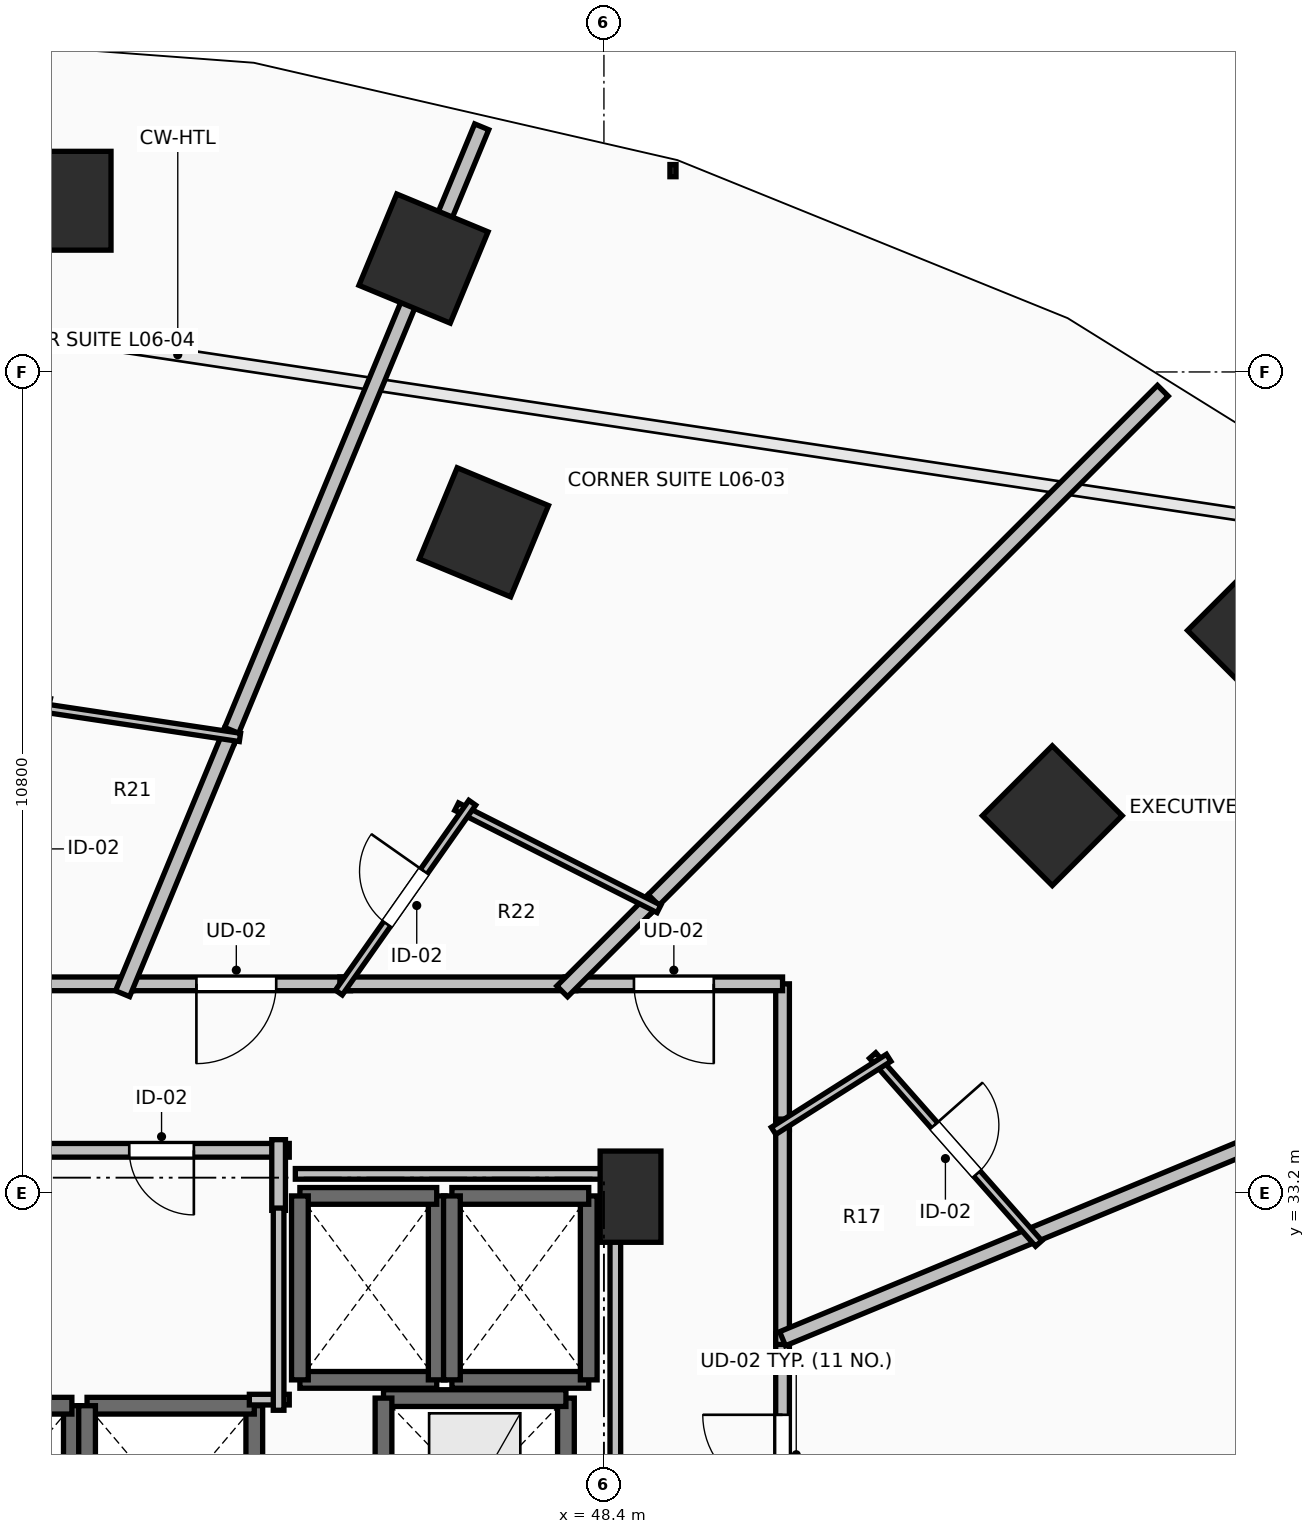
"""IFC4 building model, lengths in metres.
Left out: names, types, materials, properties, quantities, classifications, styles, units other than length and angle.
Written with IfcOpenShell. Run it as: python <this file> out.ifc"""

import sys

from ifc_helpers import new_model, si_unit, direction, frame, frame_2d, origin, origin_2d, place, context, subcontext, project, spatial, rectangle, extrude, element, fill, save


model = new_model("IFC4")
c1 = context("Model", 3, precision=1e-05, world=origin(), true_north=direction((0.0, 1.0)))
c2 = subcontext(c1, "Body", "Model", "MODEL_VIEW")
j1 = project(units=[si_unit("LENGTHUNIT", "METRE"), si_unit("PLANEANGLEUNIT", "RADIAN")], contexts=[c1])
p1 = place(None, origin())
s1 = spatial("IfcSite", under=j1, at=p1, CompositionType="ELEMENT")
p2 = place(p1, origin())
s2 = spatial("IfcBuilding", under=s1, at=p2, CompositionType="ELEMENT")
p3 = place(p2, frame((0.0, 0.0, 27.5)))
s3 = spatial("IfcBuildingStorey", under=s2, at=p3, CompositionType="ELEMENT", Elevation=27.5)
for number, where, z_axis, x_axis in (
    (1, (54.299, 38.162, 0.0), (0.0, 0.0, 1.0), (0.707, 0.707, 0.0)),
    (2, (46.821, 41.891, 0.0), (0.0, 0.0, 1.0), (0.383, 0.924, 0.0)),
    (3, (56.997, 40.6, 0.0), (0.0, 0.0, 1.0), (0.707, 0.707, 0.0)),
    (4, (46.026, 45.492, 0.0), (0.0, 0.0, 1.0), (0.383, 0.924, 0.0)),
    (5, (41.265, 46.252, 0.0), (0.0, 0.0, 1.0), (0.0, 1.0, 0.0)),
):
    element("IfcColumn", number, at=place(p3, frame(where, z_axis=z_axis, x_axis=x_axis)), inside=s3, PredefinedType="COLUMN", context=c2, shape_type="SweptSolid", body=[
        extrude(rectangle(XDim=1.3, YDim=1.3, at=origin_2d()), origin(), (0.0, 0.0, 1.0), 3.5),
    ])
p4 = place(p3, frame((48.75, 33.15, 0.0), z_axis=(0.0, 0.0, 1.0), x_axis=(1.0, 0.0, 0.0)))
e6 = element("IfcColumn", 6, at=p4, inside=s3, PredefinedType="PILASTER", context=c2, shape_type="SweptSolid", body=[
    extrude(rectangle(XDim=0.8, YDim=1.2, at=origin_2d()), origin(), (0.0, 0.0, 1.0), 3.5),
])
p5 = place(p3, frame((41.4, 27.8, 0.0), z_axis=(0.0, 0.0, 1.0), x_axis=(0.0, 1.0, 0.0)))
e7 = element("IfcWall", 7, at=p5, inside=s3, PredefinedType="SOLIDWALL", context=c2, shape_type="SweptSolid", body=[
    extrude(rectangle(XDim=2.6, YDim=0.22, at=frame_2d((1.3, 0.0))), origin(), (0.0, 0.0, 1.0), 3.24),
])
p6 = place(p3, frame((41.4, 30.4, 0.0), z_axis=(0.0, 0.0, 1.0), x_axis=(-1.0, 0.0, 0.0)))
e8 = element("IfcWall", 8, at=p6, inside=s3, PredefinedType="SOLIDWALL", context=c2, shape_type="SweptSolid", body=[
    extrude(rectangle(XDim=2.2, YDim=0.22, at=frame_2d((1.1, 0.0))), origin(), (0.0, 0.0, 1.0), 3.24),
])
p7 = place(p3, frame((43.8, 27.8, 0.0), z_axis=(0.0, 0.0, 1.0), x_axis=(0.0, 1.0, 0.0)))
e9 = element("IfcWall", 9, at=p7, inside=s3, PredefinedType="SOLIDWALL", context=c2, shape_type="SweptSolid", body=[
    extrude(rectangle(XDim=2.6, YDim=0.22, at=frame_2d((1.3, 0.0))), origin(), (0.0, 0.0, 1.0), 3.24),
])
p8 = place(p3, frame((43.8, 30.4, 0.0), z_axis=(0.0, 0.0, 1.0), x_axis=(-1.0, 0.0, 0.0)))
e10 = element("IfcWall", 10, at=p8, inside=s3, PredefinedType="SOLIDWALL", context=c2, shape_type="SweptSolid", body=[
    extrude(rectangle(XDim=2.2, YDim=0.22, at=frame_2d((1.1, 0.0))), origin(), (0.0, 0.0, 1.0), 3.24),
])
p9 = place(p3, frame((41.6, 30.4, 0.0), z_axis=(0.0, 0.0, 1.0), x_axis=(0.0, -1.0, 0.0)))
e11 = element("IfcWall", 11, at=p9, inside=s3, PredefinedType="SOLIDWALL", context=c2, shape_type="SweptSolid", body=[
    extrude(rectangle(XDim=2.6, YDim=0.22, at=frame_2d((1.3, 0.0))), origin(), (0.0, 0.0, 1.0), 3.24),
])
p10 = place(p3, frame((44.4, 30.74, 0.0), z_axis=(0.0, 0.0, 1.0), x_axis=(1.0, 0.0, 0.0)))
e12 = element("IfcWall", 12, at=p10, inside=s3, PredefinedType="SOLIDWALL", context=c2, shape_type="SweptSolid", body=[
    extrude(rectangle(XDim=1.8, YDim=0.22, at=frame_2d((0.9, 0.0))), origin(), (0.0, 0.0, 1.0), 3.24),
])
p11 = place(p3, frame((46.2, 30.74, 0.0), z_axis=(0.0, 0.0, 1.0), x_axis=(0.0, 1.0, 0.0)))
e13 = element("IfcWall", 13, at=p11, inside=s3, PredefinedType="SOLIDWALL", context=c2, shape_type="SweptSolid", body=[
    extrude(rectangle(XDim=2.42, YDim=0.22, at=frame_2d((1.21, 0.0))), origin(), (0.0, 0.0, 1.0), 3.24),
])
p12 = place(p3, frame((46.2, 33.16, 0.0), z_axis=(0.0, 0.0, 1.0), x_axis=(-1.0, 0.0, 0.0)))
e14 = element("IfcWall", 14, at=p12, inside=s3, PredefinedType="SOLIDWALL", context=c2, shape_type="SweptSolid", body=[
    extrude(rectangle(XDim=1.8, YDim=0.22, at=frame_2d((0.9, 0.0))), origin(), (0.0, 0.0, 1.0), 3.24),
])
p13 = place(p3, frame((44.4, 33.16, 0.0), z_axis=(0.0, 0.0, 1.0), x_axis=(0.0, -1.0, 0.0)))
e15 = element("IfcWall", 15, at=p13, inside=s3, PredefinedType="SOLIDWALL", context=c2, shape_type="SweptSolid", body=[
    extrude(rectangle(XDim=2.42, YDim=0.22, at=frame_2d((1.21, 0.0))), origin(), (0.0, 0.0, 1.0), 3.24),
])
p14 = place(p3, frame((46.4, 30.74, 0.0), z_axis=(0.0, 0.0, 1.0), x_axis=(1.0, 0.0, 0.0)))
e16 = element("IfcWall", 16, at=p14, inside=s3, PredefinedType="SOLIDWALL", context=c2, shape_type="SweptSolid", body=[
    extrude(rectangle(XDim=1.8, YDim=0.22, at=frame_2d((0.9, 0.0))), origin(), (0.0, 0.0, 1.0), 3.24),
])
p15 = place(p3, frame((48.2, 30.74, 0.0), z_axis=(0.0, 0.0, 1.0), x_axis=(0.0, 1.0, 0.0)))
e17 = element("IfcWall", 17, at=p15, inside=s3, PredefinedType="SOLIDWALL", context=c2, shape_type="SweptSolid", body=[
    extrude(rectangle(XDim=2.42, YDim=0.22, at=frame_2d((1.21, 0.0))), origin(), (0.0, 0.0, 1.0), 3.24),
])
p16 = place(p3, frame((48.2, 33.16, 0.0), z_axis=(0.0, 0.0, 1.0), x_axis=(-1.0, 0.0, 0.0)))
e18 = element("IfcWall", 18, at=p16, inside=s3, PredefinedType="SOLIDWALL", context=c2, shape_type="SweptSolid", body=[
    extrude(rectangle(XDim=1.8, YDim=0.22, at=frame_2d((0.9, 0.0))), origin(), (0.0, 0.0, 1.0), 3.24),
])
p17 = place(p3, frame((46.4, 33.16, 0.0), z_axis=(0.0, 0.0, 1.0), x_axis=(0.0, -1.0, 0.0)))
e19 = element("IfcWall", 19, at=p17, inside=s3, PredefinedType="SOLIDWALL", context=c2, shape_type="SweptSolid", body=[
    extrude(rectangle(XDim=2.42, YDim=0.22, at=frame_2d((1.21, 0.0))), origin(), (0.0, 0.0, 1.0), 3.24),
])
p18 = place(p3, frame((47.9, 28.0, 0.0), z_axis=(0.0, 0.0, 1.0), x_axis=(0.0, 1.0, 0.0)))
e20 = element("IfcWall", 20, at=p18, inside=s3, PredefinedType="SHEAR", context=c2, shape_type="SweptSolid", body=[
    extrude(rectangle(XDim=2.5, YDim=0.22, at=frame_2d((1.25, 0.0))), origin(), (0.0, 0.0, 1.0), 3.24),
])
p19 = place(p3, frame((47.9, 30.5, 0.0), z_axis=(0.0, 0.0, 1.0), x_axis=(-1.0, 0.0, 0.0)))
e21 = element("IfcWall", 21, at=p19, inside=s3, PredefinedType="SHEAR", context=c2, shape_type="SweptSolid", body=[
    extrude(rectangle(XDim=2.4, YDim=0.22, at=frame_2d((1.2, 0.0))), origin(), (0.0, 0.0, 1.0), 3.24),
])
p20 = place(p3, frame((45.5, 30.5, 0.0), z_axis=(0.0, 0.0, 1.0), x_axis=(0.0, -1.0, 0.0)))
e22 = element("IfcWall", 22, at=p20, inside=s3, PredefinedType="SHEAR", context=c2, shape_type="SweptSolid", body=[
    extrude(rectangle(XDim=2.5, YDim=0.22, at=frame_2d((1.25, 0.0))), origin(), (0.0, 0.0, 1.0), 3.24),
])
p21 = place(p3, frame((44.26, 33.76, 0.0), z_axis=(0.0, 0.0, 1.0), x_axis=(-1.0, 0.0, 0.0)))
e23 = element("IfcWall", 23, at=p21, inside=s3, PredefinedType="PARTITIONING", context=c2, shape_type="SweptSolid", body=[
    extrude(rectangle(XDim=3.36, YDim=0.18, at=frame_2d((1.68, 0.0))), origin(), (0.0, 0.0, 1.0), 3.24),
])
p22 = place(p21, frame((1.255, 0.0, 0.0)))
e24 = element("IfcOpeningElement", 24, at=p22, cuts=e23, PredefinedType="OPENING", context=c2, shape_type="SweptSolid", body=[
    extrude(rectangle(XDim=0.85, YDim=2.1, at=frame_2d((0.425, 1.05))), frame((0.0, 0.105, 0.0), z_axis=(0.0, -1.0, 0.0), x_axis=(1.0, 0.0, 0.0)), (0.0, 0.0, 1.0), 0.21),
])
p23 = place(p3, frame((44.12, 32.97, 0.0), z_axis=(0.0, 0.0, 1.0), x_axis=(0.0, 1.0, 0.0)))
e25 = element("IfcWall", 25, at=p23, inside=s3, PredefinedType="PARTITIONING", context=c2, shape_type="SweptSolid", body=[
    extrude(rectangle(XDim=0.93, YDim=0.18, at=frame_2d((0.465, 0.0))), origin(), (0.0, 0.0, 1.0), 3.24),
])
p24 = place(p3, frame((50.75, 28.165, 0.0), z_axis=(0.0, 0.0, 1.0), x_axis=(0.0, 1.0, 0.0)))
e26 = element("IfcWall", 26, at=p24, inside=s3, PredefinedType="PARTITIONING", context=c2, shape_type="SweptSolid", body=[
    extrude(rectangle(XDim=3.181, YDim=0.18, at=frame_2d((1.59, 0.0))), origin(), (0.0, 0.0, 1.0), 3.24),
])
p25 = place(p24, frame((1.065, 0.0, 0.0)))
e27 = element("IfcOpeningElement", 27, at=p25, cuts=e26, PredefinedType="OPENING", context=c2, shape_type="SweptSolid", body=[
    extrude(rectangle(XDim=1.05, YDim=2.2, at=frame_2d((0.525, 1.1))), frame((0.0, 0.105, 0.0), z_axis=(0.0, -1.0, 0.0), x_axis=(1.0, 0.0, 0.0)), (0.0, 0.0, 1.0), 0.21),
])
p26 = place(p3, frame((50.75, 34.031, 0.0), z_axis=(0.0, 0.0, 1.0), x_axis=(0.0, 1.0, 0.0)))
e28 = element("IfcWall", 28, at=p26, inside=s3, PredefinedType="PARTITIONING", context=c2, shape_type="SweptSolid", body=[
    extrude(rectangle(XDim=1.919, YDim=0.18, at=frame_2d((0.959, 0.0))), origin(), (0.0, 0.0, 1.0), 2.432),
])
p27 = place(p3, frame((50.75, 35.95, 0.0), z_axis=(0.0, 0.0, 1.0), x_axis=(-1.0, 0.0, 0.0)))
e29 = element("IfcWall", 29, at=p27, inside=s3, PredefinedType="PARTITIONING", context=c2, shape_type="SweptSolid", body=[
    extrude(rectangle(XDim=2.86, YDim=0.18, at=frame_2d((1.43, 0.0))), origin(), (0.0, 0.0, 1.0), 2.432),
])
p28 = place(p27, frame((0.905, 0.0, 0.0)))
e30 = element("IfcOpeningElement", 30, at=p28, cuts=e29, PredefinedType="OPENING", context=c2, shape_type="SweptSolid", body=[
    extrude(rectangle(XDim=1.05, YDim=2.2, at=frame_2d((0.525, 1.1))), frame((0.0, 0.105, 0.0), z_axis=(0.0, -1.0, 0.0), x_axis=(1.0, 0.0, 0.0)), (0.0, 0.0, 1.0), 0.21),
])
p29 = place(p3, frame((50.75, 31.206, 0.0), z_axis=(0.0, 0.0, 1.0), x_axis=(0.0, 1.0, 0.0)))
e31 = element("IfcWall", 31, at=p29, inside=s3, PredefinedType="PARTITIONING", context=c2, shape_type="SweptSolid", body=[
    extrude(rectangle(XDim=2.965, YDim=0.18, at=frame_2d((1.482, 0.0))), origin(), (0.0, 0.0, 1.0), 2.432),
])
p30 = place(p3, frame((45.066, 35.95, 0.0), z_axis=(0.0, 0.0, 1.0), x_axis=(-1.0, 0.0, 0.0)))
e32 = element("IfcWall", 32, at=p30, inside=s3, PredefinedType="PARTITIONING", context=c2, shape_type="SweptSolid", body=[
    extrude(rectangle(XDim=3.005, YDim=0.18, at=frame_2d((1.502, 0.0))), origin(), (0.0, 0.0, 1.0), 3.24),
])
p31 = place(p30, frame((0.978, 0.0, 0.0)))
e33 = element("IfcOpeningElement", 33, at=p31, cuts=e32, PredefinedType="OPENING", context=c2, shape_type="SweptSolid", body=[
    extrude(rectangle(XDim=1.05, YDim=2.2, at=frame_2d((0.525, 1.1))), frame((0.0, 0.105, 0.0), z_axis=(0.0, -1.0, 0.0), x_axis=(1.0, 0.0, 0.0)), (0.0, 0.0, 1.0), 0.21),
])
p32 = place(p3, frame((48.03, 35.95, 0.0), z_axis=(0.0, 0.0, 1.0), x_axis=(-1.0, 0.0, 0.0)))
e34 = element("IfcWall", 34, at=p32, inside=s3, PredefinedType="PARTITIONING", context=c2, shape_type="SweptSolid", body=[
    extrude(rectangle(XDim=3.104, YDim=0.18, at=frame_2d((1.552, 0.0))), origin(), (0.0, 0.0, 1.0), 2.432),
])
p33 = place(p3, frame((42.201, 35.95, 0.0), z_axis=(0.0, 0.0, 1.0), x_axis=(-1.0, 0.0, 0.0)))
e35 = element("IfcWall", 35, at=p33, inside=s3, PredefinedType="PARTITIONING", context=c2, shape_type="SweptSolid", body=[
    extrude(rectangle(XDim=2.056, YDim=0.18, at=frame_2d((1.028, 0.0))), origin(), (0.0, 0.0, 1.0), 3.24),
])
p34 = place(p3, frame((63.793, 36.684, 0.0), z_axis=(0.0, 0.0, 1.0), x_axis=(-0.923866969846, -0.382713759914, 0.0)))
e36 = element("IfcWall", 36, at=p34, inside=s3, PredefinedType="PARTITIONING", context=c2, shape_type="SweptSolid", body=[
    extrude(rectangle(XDim=14.118, YDim=0.2, at=frame_2d((7.059, 0.0))), origin(), (0.0, 0.0, 1.0), 2.432),
])
p35 = place(p3, frame((51.935, 35.007, 0.0), z_axis=(0.0, 0.0, 1.0), x_axis=(0.662059609276, -0.749451181709, 0.0)))
e37 = element("IfcWall", 37, at=p35, inside=s3, PredefinedType="PARTITIONING", context=c2, shape_type="SweptSolid", body=[
    extrude(rectangle(XDim=3.299, YDim=0.11, at=frame_2d((1.65, 0.0))), origin(), (0.0, 0.0, 1.0), 2.432),
])
p36 = place(p35, frame((1.225, 0.0, 0.0)))
e38 = element("IfcOpeningElement", 38, at=p36, cuts=e37, PredefinedType="OPENING", context=c2, shape_type="SweptSolid", body=[
    extrude(rectangle(XDim=0.85, YDim=2.1, at=frame_2d((0.425, 1.05))), frame((0.0, 0.07, 0.0), z_axis=(0.0, -1.0, 0.0), x_axis=(1.0, 0.0, 0.0)), (0.0, 0.0, 1.0), 0.14),
])
p37 = place(p3, frame((50.632, 34.016, 0.0), z_axis=(0.0, 0.0, 1.0), x_axis=(0.844361394482, 0.535774052665, 0.0)))
e39 = element("IfcWall", 39, at=p37, inside=s3, PredefinedType="PARTITIONING", context=c2, shape_type="SweptSolid", body=[
    extrude(rectangle(XDim=1.793, YDim=0.11, at=frame_2d((0.897, 0.0))), origin(), (0.0, 0.0, 1.0), 2.922),
])
p38 = place(p3, frame((55.753, 43.753, 0.0), z_axis=(0.0, 0.0, 1.0), x_axis=(-0.707106781187, -0.707106781187, 0.0)))
e40 = element("IfcWall", 40, at=p38, inside=s3, PredefinedType="PARTITIONING", context=c2, shape_type="SweptSolid", body=[
    extrude(rectangle(XDim=9.615, YDim=0.2, at=frame_2d((4.808, 0.0))), origin(), (0.0, 0.0, 1.0), 2.624),
])
p39 = place(p3, frame((49.053, 37.053, 0.0), z_axis=(0.0, 0.0, 1.0), x_axis=(-0.707106781187, -0.707106781187, 0.0)))
e41 = element("IfcWall", 41, at=p39, inside=s3, PredefinedType="PARTITIONING", context=c2, shape_type="SweptSolid", body=[
    extrude(rectangle(XDim=1.7, YDim=0.2, at=frame_2d((0.85, 0.0))), origin(), (0.0, 0.0, 1.0), 2.432),
])
p40 = place(p3, frame((46.462, 38.281, 0.0), z_axis=(0.0, 0.0, 1.0), x_axis=(0.892486842203, -0.451073426944, 0.0)))
e42 = element("IfcWall", 42, at=p40, inside=s3, PredefinedType="PARTITIONING", context=c2, shape_type="SweptSolid", body=[
    extrude(rectangle(XDim=2.982, YDim=0.11, at=frame_2d((1.491, 0.0))), origin(), (0.0, 0.0, 1.0), 2.432),
])
p41 = place(p3, frame((44.913, 35.835, 0.0), z_axis=(0.0, 0.0, 1.0), x_axis=(0.574986040322, 0.818163219312, 0.0)))
e43 = element("IfcWall", 43, at=p41, inside=s3, PredefinedType="PARTITIONING", context=c2, shape_type="SweptSolid", body=[
    extrude(rectangle(XDim=3.052, YDim=0.11, at=frame_2d((1.526, 0.0))), origin(), (0.0, 0.0, 1.0), 2.922),
])
p42 = place(p41, frame((1.101, 0.0, 0.0)))
e44 = element("IfcOpeningElement", 44, at=p42, cuts=e43, PredefinedType="OPENING", context=c2, shape_type="SweptSolid", body=[
    extrude(rectangle(XDim=0.85, YDim=2.1, at=frame_2d((0.425, 1.05))), frame((0.0, 0.07, 0.0), z_axis=(0.0, -1.0, 0.0), x_axis=(1.0, 0.0, 0.0)), (0.0, 0.0, 1.0), 0.14),
])
p43 = place(p3, frame((46.792, 47.225, 0.0), z_axis=(0.0, 0.0, 1.0), x_axis=(-0.382750893248, -0.923851586413, 0.0)))
e45 = element("IfcWall", 45, at=p43, inside=s3, PredefinedType="PARTITIONING", context=c2, shape_type="SweptSolid", body=[
    extrude(rectangle(XDim=8.734, YDim=0.2, at=frame_2d((4.367, 0.0))), origin(), (0.0, 0.0, 1.0), 2.874),
])
p44 = place(p3, frame((43.503, 39.285, 0.0), z_axis=(0.0, 0.0, 1.0), x_axis=(-0.382867331148, -0.923803337697, 0.0)))
e46 = element("IfcWall", 46, at=p44, inside=s3, PredefinedType="PARTITIONING", context=c2, shape_type="SweptSolid", body=[
    extrude(rectangle(XDim=3.75, YDim=0.2, at=frame_2d((1.875, 0.0))), origin(), (0.0, 0.0, 1.0), 2.922),
])
p45 = place(p3, frame((40.896, 39.6, 0.0), z_axis=(0.0, 0.0, 1.0), x_axis=(0.98891024541, -0.148514398367, 0.0)))
e47 = element("IfcWall", 47, at=p45, inside=s3, PredefinedType="PARTITIONING", context=c2, shape_type="SweptSolid", body=[
    extrude(rectangle(XDim=2.745, YDim=0.11, at=frame_2d((1.373, 0.0))), origin(), (0.0, 0.0, 1.0), 3.24),
])
p46 = place(p3, frame((43.735, 30.48, 0.0), z_axis=(0.0, 0.0, 1.0), x_axis=(1.0, 0.0, 0.0)))
e48 = element("IfcWall", 48, at=p46, inside=s3, PredefinedType="PARTITIONING", context=c2, shape_type="SweptSolid", body=[
    extrude(rectangle(XDim=0.525, YDim=0.14, at=frame_2d((0.262, 0.0))), origin(), (0.0, 0.0, 1.0), 3.24),
])
p47 = place(p3, frame((44.12, 30.34, 0.0), z_axis=(0.0, 0.0, 1.0), x_axis=(0.0, 1.0, 0.0)))
e49 = element("IfcWall", 49, at=p47, inside=s3, PredefinedType="PARTITIONING", context=c2, shape_type="SweptSolid", body=[
    extrude(rectangle(XDim=2.66, YDim=0.14, at=frame_2d((1.33, 0.0))), origin(), (0.0, 0.0, 1.0), 3.24),
])
p48 = place(p3, frame((44.34, 33.45, 0.0), z_axis=(0.0, 0.0, 1.0), x_axis=(1.0, 0.0, 0.0)))
e50 = element("IfcWall", 50, at=p48, inside=s3, PredefinedType="PARTITIONING", context=c2, shape_type="SweptSolid", body=[
    extrude(rectangle(XDim=4.21, YDim=0.14, at=frame_2d((2.105, 0.0))), origin(), (0.0, 0.0, 1.0), 2.432),
])
p49 = place(p3, frame((48.55, 33.45, 0.0), z_axis=(0.0, 0.0, 1.0), x_axis=(0.0, -1.0, 0.0)))
e51 = element("IfcWall", 51, at=p49, inside=s3, PredefinedType="PARTITIONING", context=c2, shape_type="SweptSolid", body=[
    extrude(rectangle(XDim=5.254, YDim=0.14, at=frame_2d((2.627, 0.0))), origin(), (0.0, 0.0, 1.0), 2.432),
])
p50 = place(p22, origin())
e52 = element("IfcDoor", 52, at=p50, inside=s3, OperationType="SINGLE_SWING_LEFT", PredefinedType="DOOR", context=c2, shape_type="SweptSolid", body=[
    extrude(rectangle(XDim=0.85, YDim=2.1, at=frame_2d((0.425, 1.05))), frame((0.0, 0.025, 0.0), z_axis=(0.0, -1.0, 0.0), x_axis=(1.0, 0.0, 0.0)), (0.0, 0.0, 1.0), 0.05),
])
fill(e24, e52)
p51 = place(p25, origin())
e53 = element("IfcDoor", 53, at=p51, inside=s3, OperationType="SINGLE_SWING_RIGHT", PredefinedType="DOOR", context=c2, shape_type="SweptSolid", body=[
    extrude(rectangle(XDim=1.05, YDim=2.2, at=frame_2d((0.525, 1.1))), frame((0.0, 0.025, 0.0), z_axis=(0.0, -1.0, 0.0), x_axis=(1.0, 0.0, 0.0)), (0.0, 0.0, 1.0), 0.05),
])
fill(e27, e53)
p52 = place(p28, origin())
e54 = element("IfcDoor", 54, at=p52, inside=s3, OperationType="SINGLE_SWING_LEFT", PredefinedType="DOOR", context=c2, shape_type="SweptSolid", body=[
    extrude(rectangle(XDim=1.05, YDim=2.2, at=frame_2d((0.525, 1.1))), frame((0.0, 0.025, 0.0), z_axis=(0.0, -1.0, 0.0), x_axis=(1.0, 0.0, 0.0)), (0.0, 0.0, 1.0), 0.05),
])
fill(e30, e54)
p53 = place(p31, origin())
e55 = element("IfcDoor", 55, at=p53, inside=s3, OperationType="SINGLE_SWING_RIGHT", PredefinedType="DOOR", context=c2, shape_type="SweptSolid", body=[
    extrude(rectangle(XDim=1.05, YDim=2.2, at=frame_2d((0.525, 1.1))), frame((0.0, 0.025, 0.0), z_axis=(0.0, -1.0, 0.0), x_axis=(1.0, 0.0, 0.0)), (0.0, 0.0, 1.0), 0.05),
])
fill(e33, e55)
p54 = place(p36, origin())
e56 = element("IfcDoor", 56, at=p54, inside=s3, OperationType="SINGLE_SWING_LEFT", PredefinedType="DOOR", context=c2, shape_type="SweptSolid", body=[
    extrude(rectangle(XDim=0.85, YDim=2.1, at=frame_2d((0.425, 1.05))), frame((0.0, 0.025, 0.0), z_axis=(0.0, -1.0, 0.0), x_axis=(1.0, 0.0, 0.0)), (0.0, 0.0, 1.0), 0.05),
])
fill(e38, e56)
p55 = place(p42, origin())
e57 = element("IfcDoor", 57, at=p55, inside=s3, OperationType="SINGLE_SWING_RIGHT", PredefinedType="DOOR", context=c2, shape_type="SweptSolid", body=[
    extrude(rectangle(XDim=0.85, YDim=2.1, at=frame_2d((0.425, 1.05))), frame((0.0, 0.025, 0.0), z_axis=(0.0, -1.0, 0.0), x_axis=(1.0, 0.0, 0.0)), (0.0, 0.0, 1.0), 0.05),
])
fill(e44, e57)
save(model, sys.argv[1])
